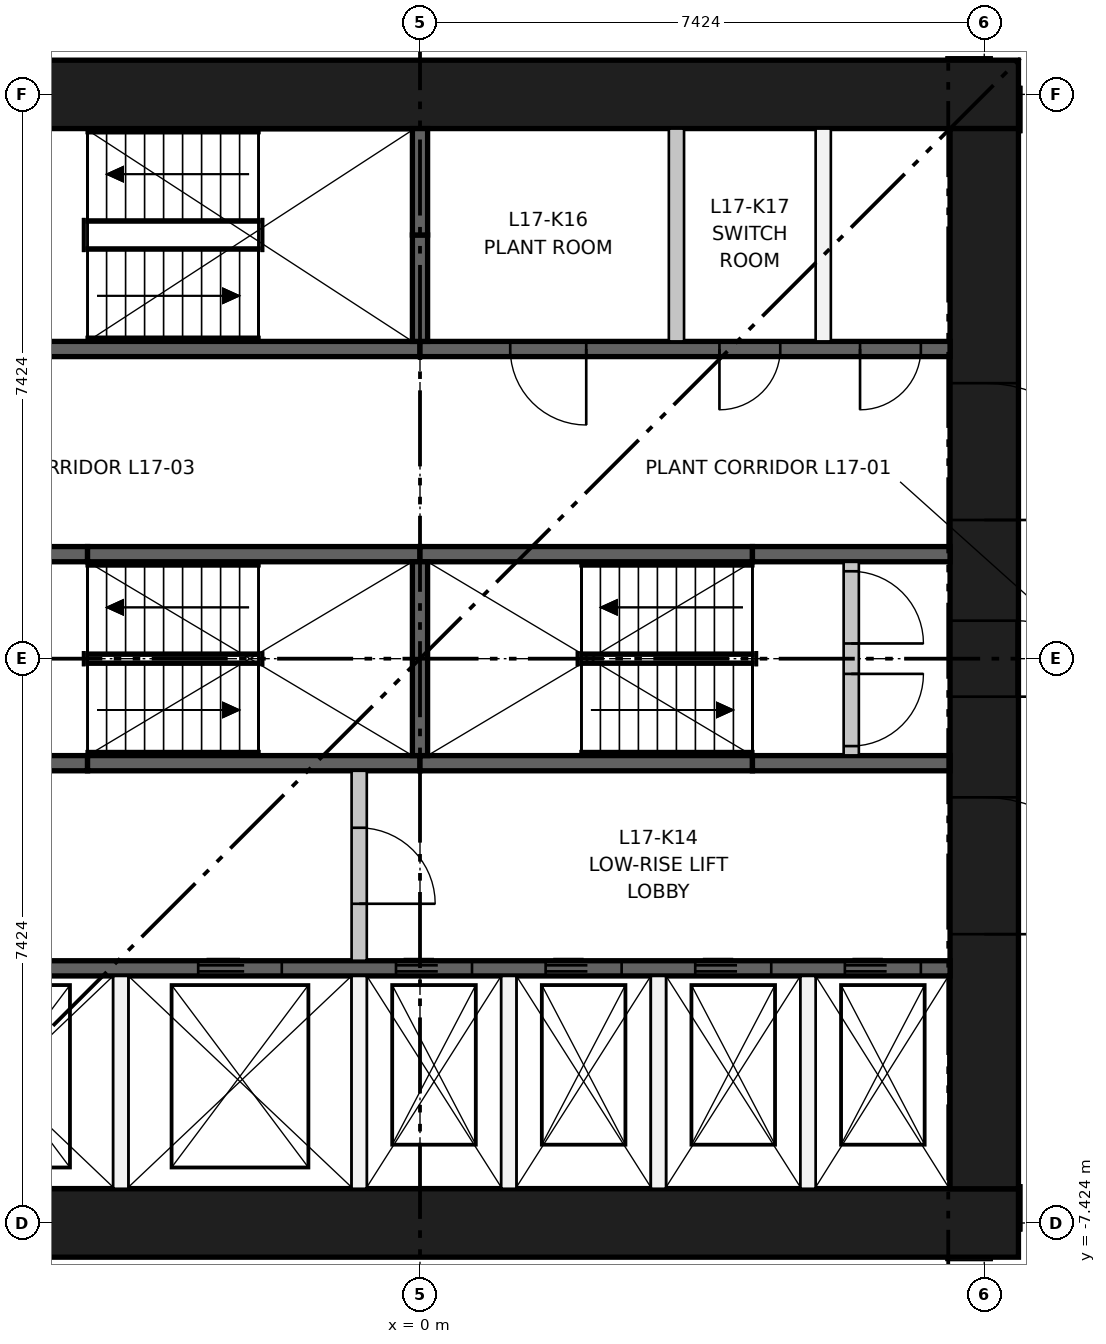
"""IFC4 building model, lengths in metres.
Left out: names, types, materials, properties, quantities, classifications, styles, units other than length and angle.
Written with IfcOpenShell. Run it as: python <this file> out.ifc"""

import sys

from ifc_helpers import new_model, si_unit, direction, frame, frame_2d, origin, place, context, subcontext, project, spatial, rectangle, extrude, element, fill, save


model = new_model("IFC4")
c1 = context("Model", 3, precision=1e-05, world=origin(), true_north=direction((0.0, 1.0)))
c2 = subcontext(c1, "Body", "Model", "MODEL_VIEW")
j1 = project(units=[si_unit("LENGTHUNIT", "METRE"), si_unit("PLANEANGLEUNIT", "RADIAN")], contexts=[c1])
p1 = place(None, origin())
s1 = spatial("IfcSite", under=j1, at=p1, CompositionType="ELEMENT")
p2 = place(p1, origin())
s2 = spatial("IfcBuilding", under=s1, at=p2, CompositionType="ELEMENT")
p3 = place(p2, frame((0.0, 0.0, 66.35)))
s3 = spatial("IfcBuildingStorey", under=s2, at=p3, CompositionType="ELEMENT", Elevation=66.35)
for number, where, z_axis, x_axis in (
    (1, (-7.874, -7.424, 0.0), (0.0, 0.0, 1.0), (1.0, 0.0, 0.0)),
    (2, (-7.874, 7.424, 0.0), (0.0, 0.0, 1.0), (1.0, 0.0, 0.0)),
):
    element("IfcWall", number, at=place(p3, frame(where, z_axis=z_axis, x_axis=x_axis)), inside=s3, PredefinedType="SHEAR", context=c2, shape_type="SweptSolid", body=[
        extrude(rectangle(XDim=15.748, YDim=0.9, at=frame_2d((7.874, 0.0))), origin(), (0.0, 0.0, 1.0), 6.4),
    ])
p4 = place(p3, frame((7.424, -6.974, 0.0), z_axis=(0.0, 0.0, 1.0), x_axis=(0.0, 1.0, 0.0)))
e3 = element("IfcWall", 3, at=p4, inside=s3, PredefinedType="SHEAR", context=c2, shape_type="SweptSolid", body=[
    extrude(rectangle(XDim=13.948, YDim=0.9, at=frame_2d((6.974, 0.0))), origin(), (0.0, 0.0, 1.0), 6.4),
])
p5 = place(p4, frame((6.474, 0.0, 0.0)))
e4 = element("IfcOpeningElement", 4, at=p5, cuts=e3, PredefinedType="OPENING", context=c2, shape_type="SweptSolid", body=[
    extrude(rectangle(XDim=1.0, YDim=2.1, at=frame_2d((0.5, 1.05))), frame((0.0, 0.46, 0.0), z_axis=(0.0, -1.0, 0.0), x_axis=(1.0, 0.0, 0.0)), (0.0, 0.0, 1.0), 0.92),
])
p6 = place(p4, frame((3.35, 0.0, 0.0)))
e5 = element("IfcOpeningElement", 5, at=p6, cuts=e3, PredefinedType="OPENING", context=c2, shape_type="SweptSolid", body=[
    extrude(rectangle(XDim=1.8, YDim=2.1, at=frame_2d((0.9, 1.05))), frame((0.0, 0.46, 0.0), z_axis=(0.0, -1.0, 0.0), x_axis=(1.0, 0.0, 0.0)), (0.0, 0.0, 1.0), 0.92),
])
p7 = place(p4, frame((8.799, 0.0, 0.0)))
e6 = element("IfcOpeningElement", 6, at=p7, cuts=e3, PredefinedType="OPENING", context=c2, shape_type="SweptSolid", body=[
    extrude(rectangle(XDim=1.8, YDim=2.1, at=frame_2d((0.9, 1.05))), frame((0.0, 0.46, 0.0), z_axis=(0.0, -1.0, 0.0), x_axis=(1.0, 0.0, 0.0)), (0.0, 0.0, 1.0), 0.92),
])
p8 = place(p3, frame((-6.974, -4.074, 0.0), z_axis=(0.0, 0.0, 1.0), x_axis=(1.0, 0.0, 0.0)))
e7 = element("IfcWall", 7, at=p8, inside=s3, PredefinedType="SHEAR", context=c2, shape_type="SweptSolid", body=[
    extrude(rectangle(XDim=13.948, YDim=0.2, at=frame_2d((6.974, 0.0))), origin(), (0.0, 0.0, 1.0), 6.05),
])
p9 = place(p8, frame((0.918, 0.0, 0.0)))
e8 = element("IfcOpeningElement", 8, at=p9, cuts=e7, PredefinedType="OPENING", context=c2, shape_type="SweptSolid", body=[
    extrude(rectangle(XDim=1.1, YDim=2.1, at=frame_2d((0.55, 1.05))), frame((0.0, 0.11, 0.0), z_axis=(0.0, -1.0, 0.0), x_axis=(1.0, 0.0, 0.0)), (0.0, 0.0, 1.0), 0.22),
])
p10 = place(p8, frame((4.055, 0.0, 0.0)))
e9 = element("IfcOpeningElement", 9, at=p10, cuts=e7, PredefinedType="OPENING", context=c2, shape_type="SweptSolid", body=[
    extrude(rectangle(XDim=1.1, YDim=2.1, at=frame_2d((0.55, 1.05))), frame((0.0, 0.11, 0.0), z_axis=(0.0, -1.0, 0.0), x_axis=(1.0, 0.0, 0.0)), (0.0, 0.0, 1.0), 0.22),
])
p11 = place(p8, frame((6.658, 0.0, 0.0)))
e10 = element("IfcOpeningElement", 10, at=p11, cuts=e7, PredefinedType="OPENING", context=c2, shape_type="SweptSolid", body=[
    extrude(rectangle(XDim=1.0, YDim=2.1, at=frame_2d((0.5, 1.05))), frame((0.0, 0.11, 0.0), z_axis=(0.0, -1.0, 0.0), x_axis=(1.0, 0.0, 0.0)), (0.0, 0.0, 1.0), 0.22),
])
p12 = place(p8, frame((8.627, 0.0, 0.0)))
e11 = element("IfcOpeningElement", 11, at=p12, cuts=e7, PredefinedType="OPENING", context=c2, shape_type="SweptSolid", body=[
    extrude(rectangle(XDim=1.0, YDim=2.1, at=frame_2d((0.5, 1.05))), frame((0.0, 0.11, 0.0), z_axis=(0.0, -1.0, 0.0), x_axis=(1.0, 0.0, 0.0)), (0.0, 0.0, 1.0), 0.22),
])
p13 = place(p8, frame((10.595, 0.0, 0.0)))
e12 = element("IfcOpeningElement", 12, at=p13, cuts=e7, PredefinedType="OPENING", context=c2, shape_type="SweptSolid", body=[
    extrude(rectangle(XDim=1.0, YDim=2.1, at=frame_2d((0.5, 1.05))), frame((0.0, 0.11, 0.0), z_axis=(0.0, -1.0, 0.0), x_axis=(1.0, 0.0, 0.0)), (0.0, 0.0, 1.0), 0.22),
])
p14 = place(p8, frame((12.564, 0.0, 0.0)))
e13 = element("IfcOpeningElement", 13, at=p14, cuts=e7, PredefinedType="OPENING", context=c2, shape_type="SweptSolid", body=[
    extrude(rectangle(XDim=1.0, YDim=2.1, at=frame_2d((0.5, 1.05))), frame((0.0, 0.11, 0.0), z_axis=(0.0, -1.0, 0.0), x_axis=(1.0, 0.0, 0.0)), (0.0, 0.0, 1.0), 0.22),
])
p15 = place(p3, frame((-6.974, 4.074, 0.0), z_axis=(0.0, 0.0, 1.0), x_axis=(1.0, 0.0, 0.0)))
e14 = element("IfcWall", 14, at=p15, inside=s3, PredefinedType="SHEAR", context=c2, shape_type="SweptSolid", body=[
    extrude(rectangle(XDim=6.974, YDim=0.2, at=frame_2d((3.487, 0.0))), origin(), (0.0, 0.0, 1.0), 6.05),
])
p16 = place(p3, frame((0.0, 4.074, 0.0), z_axis=(0.0, 0.0, 1.0), x_axis=(1.0, 0.0, 0.0)))
e15 = element("IfcWall", 15, at=p16, inside=s3, PredefinedType="SHEAR", context=c2, shape_type="SweptSolid", body=[
    extrude(rectangle(XDim=6.974, YDim=0.2, at=frame_2d((3.487, 0.0))), origin(), (0.0, 0.0, 1.0), 6.05),
])
p17 = place(p16, frame((1.187, 0.0, 0.0)))
e16 = element("IfcOpeningElement", 16, at=p17, cuts=e15, PredefinedType="OPENING", context=c2, shape_type="SweptSolid", body=[
    extrude(rectangle(XDim=1.0, YDim=2.1, at=frame_2d((0.5, 1.05))), frame((0.0, 0.11, 0.0), z_axis=(0.0, -1.0, 0.0), x_axis=(1.0, 0.0, 0.0)), (0.0, 0.0, 1.0), 0.22),
])
p18 = place(p16, frame((3.94, 0.0, 0.0)))
e17 = element("IfcOpeningElement", 17, at=p18, cuts=e15, PredefinedType="OPENING", context=c2, shape_type="SweptSolid", body=[
    extrude(rectangle(XDim=0.8, YDim=2.1, at=frame_2d((0.4, 1.05))), frame((0.0, 0.11, 0.0), z_axis=(0.0, -1.0, 0.0), x_axis=(1.0, 0.0, 0.0)), (0.0, 0.0, 1.0), 0.22),
])
p19 = place(p16, frame((5.79, 0.0, 0.0)))
e18 = element("IfcOpeningElement", 18, at=p19, cuts=e15, PredefinedType="OPENING", context=c2, shape_type="SweptSolid", body=[
    extrude(rectangle(XDim=0.8, YDim=2.1, at=frame_2d((0.4, 1.05))), frame((0.0, 0.11, 0.0), z_axis=(0.0, -1.0, 0.0), x_axis=(1.0, 0.0, 0.0)), (0.0, 0.0, 1.0), 0.22),
])
p20 = place(p3, frame((-6.974, -1.375, 0.0), z_axis=(0.0, 0.0, 1.0), x_axis=(1.0, 0.0, 0.0)))
e19 = element("IfcWall", 19, at=p20, inside=s3, PredefinedType="SHEAR", context=c2, shape_type="SweptSolid", body=[
    extrude(rectangle(XDim=2.6, YDim=0.2, at=frame_2d((1.3, 0.0))), origin(), (0.0, 0.0, 1.0), 6.05),
])
for number, where, z_axis, x_axis in (
    (20, (-4.374, -1.375, 0.0), (0.0, 0.0, 1.0), (1.0, 0.0, 0.0)),
    (21, (0.0, -1.375, 0.0), (0.0, 0.0, 1.0), (1.0, 0.0, 0.0)),
):
    element("IfcWall", number, at=place(p3, frame(where, z_axis=z_axis, x_axis=x_axis)), inside=s3, PredefinedType="SHEAR", context=c2, shape_type="SweptSolid", body=[
        extrude(rectangle(XDim=4.374, YDim=0.2, at=frame_2d((2.187, 0.0))), origin(), (0.0, 0.0, 1.0), 6.05),
    ])
for number, where, z_axis, x_axis in (
    (22, (4.374, -1.375, 0.0), (0.0, 0.0, 1.0), (1.0, 0.0, 0.0)),
    (23, (-6.974, 1.375, 0.0), (0.0, 0.0, 1.0), (1.0, 0.0, 0.0)),
):
    element("IfcWall", number, at=place(p3, frame(where, z_axis=z_axis, x_axis=x_axis)), inside=s3, PredefinedType="SHEAR", context=c2, shape_type="SweptSolid", body=[
        extrude(rectangle(XDim=2.6, YDim=0.2, at=frame_2d((1.3, 0.0))), origin(), (0.0, 0.0, 1.0), 6.05),
    ])
for number, where, z_axis, x_axis in (
    (24, (-4.374, 1.375, 0.0), (0.0, 0.0, 1.0), (1.0, 0.0, 0.0)),
    (25, (0.0, 1.375, 0.0), (0.0, 0.0, 1.0), (1.0, 0.0, 0.0)),
):
    element("IfcWall", number, at=place(p3, frame(where, z_axis=z_axis, x_axis=x_axis)), inside=s3, PredefinedType="SHEAR", context=c2, shape_type="SweptSolid", body=[
        extrude(rectangle(XDim=4.374, YDim=0.2, at=frame_2d((2.187, 0.0))), origin(), (0.0, 0.0, 1.0), 6.05),
    ])
p21 = place(p3, frame((4.374, 1.375, 0.0), z_axis=(0.0, 0.0, 1.0), x_axis=(1.0, 0.0, 0.0)))
e26 = element("IfcWall", 26, at=p21, inside=s3, PredefinedType="SHEAR", context=c2, shape_type="SweptSolid", body=[
    extrude(rectangle(XDim=2.6, YDim=0.2, at=frame_2d((1.3, 0.0))), origin(), (0.0, 0.0, 1.0), 6.05),
])
p22 = place(p3, frame((0.0, -1.275, 0.0), z_axis=(0.0, 0.0, 1.0), x_axis=(0.0, 1.0, 0.0)))
e27 = element("IfcWall", 27, at=p22, inside=s3, PredefinedType="SHEAR", context=c2, shape_type="SweptSolid", body=[
    extrude(rectangle(XDim=2.55, YDim=0.2, at=frame_2d((1.275, 0.0))), origin(), (0.0, 0.0, 1.0), 6.05),
])
for number, where, z_axis, x_axis in (
    (28, (-3.937, -6.974, 0.0), (0.0, 0.0, 1.0), (0.0, 1.0, 0.0)),
    (29, (-0.8, -6.974, 0.0), (0.0, 0.0, 1.0), (0.0, 1.0, 0.0)),
):
    element("IfcWall", number, at=place(p3, frame(where, z_axis=z_axis, x_axis=x_axis)), inside=s3, PredefinedType="PARTITIONING", context=c2, shape_type="SweptSolid", body=[
        extrude(rectangle(XDim=2.8, YDim=0.2, at=frame_2d((1.4, 0.0))), origin(), (0.0, 0.0, 1.0), 6.05),
    ])
p23 = place(p3, frame((-0.8, -3.974, 0.0), z_axis=(0.0, 0.0, 1.0), x_axis=(0.0, 1.0, 0.0)))
e30 = element("IfcWall", 30, at=p23, inside=s3, PredefinedType="PARTITIONING", context=c2, shape_type="SweptSolid", body=[
    extrude(rectangle(XDim=2.499, YDim=0.2, at=frame_2d((1.25, 0.0))), origin(), (0.0, 0.0, 1.0), 6.05),
])
p24 = place(p23, frame((0.75, 0.0, 0.0)))
e31 = element("IfcOpeningElement", 31, at=p24, cuts=e30, PredefinedType="OPENING", context=c2, shape_type="SweptSolid", body=[
    extrude(rectangle(XDim=1.0, YDim=2.1, at=frame_2d((0.5, 1.05))), frame((0.0, 0.11, 0.0), z_axis=(0.0, -1.0, 0.0), x_axis=(1.0, 0.0, 0.0)), (0.0, 0.0, 1.0), 0.22),
])
for number, where, z_axis, x_axis in (
    (32, (1.168, -6.974, 0.0), (0.0, 0.0, 1.0), (0.0, 1.0, 0.0)),
    (33, (3.137, -6.974, 0.0), (0.0, 0.0, 1.0), (0.0, 1.0, 0.0)),
    (34, (5.105, -6.974, 0.0), (0.0, 0.0, 1.0), (0.0, 1.0, 0.0)),
):
    element("IfcWall", number, at=place(p3, frame(where, z_axis=z_axis, x_axis=x_axis)), inside=s3, PredefinedType="PARTITIONING", context=c2, shape_type="SweptSolid", body=[
        extrude(rectangle(XDim=2.8, YDim=0.2, at=frame_2d((1.4, 0.0))), origin(), (0.0, 0.0, 1.0), 6.05),
    ])
p25 = place(p3, frame((0.0, 4.174, 0.0), z_axis=(0.0, 0.0, 1.0), x_axis=(0.0, 1.0, 0.0)))
e35 = element("IfcWall", 35, at=p25, inside=s3, PredefinedType="SHEAR", context=c2, shape_type="SweptSolid", body=[
    extrude(rectangle(XDim=1.4, YDim=0.2, at=frame_2d((0.7, 0.0))), origin(), (0.0, 0.0, 1.0), 6.05),
])
p26 = place(p3, frame((0.0, 5.574, 0.0), z_axis=(0.0, 0.0, 1.0), x_axis=(0.0, 1.0, 0.0)))
e36 = element("IfcWall", 36, at=p26, inside=s3, PredefinedType="SHEAR", context=c2, shape_type="SweptSolid", body=[
    extrude(rectangle(XDim=1.4, YDim=0.2, at=frame_2d((0.7, 0.0))), origin(), (0.0, 0.0, 1.0), 6.05),
])
for number, where, z_axis, x_axis in (
    (37, (3.374, 4.174, 0.0), (0.0, 0.0, 1.0), (0.0, 1.0, 0.0)),
    (38, (5.305, 4.174, 0.0), (0.0, 0.0, 1.0), (0.0, 1.0, 0.0)),
):
    element("IfcWall", number, at=place(p3, frame(where, z_axis=z_axis, x_axis=x_axis)), inside=s3, PredefinedType="PARTITIONING", context=c2, shape_type="SweptSolid", body=[
        extrude(rectangle(XDim=2.8, YDim=0.2, at=frame_2d((1.4, 0.0))), origin(), (0.0, 0.0, 1.0), 6.05),
    ])
p27 = place(p3, frame((5.674, -1.275, 0.0), z_axis=(0.0, 0.0, 1.0), x_axis=(0.0, 1.0, 0.0)))
e39 = element("IfcWall", 39, at=p27, inside=s3, PredefinedType="PARTITIONING", context=c2, shape_type="SweptSolid", body=[
    extrude(rectangle(XDim=2.55, YDim=0.2, at=frame_2d((1.275, 0.0))), origin(), (0.0, 0.0, 1.0), 6.05),
])
p28 = place(p27, frame((0.125, 0.0, 0.0)))
e40 = element("IfcOpeningElement", 40, at=p28, cuts=e39, PredefinedType="OPENING", context=c2, shape_type="SweptSolid", body=[
    extrude(rectangle(XDim=0.95, YDim=2.1, at=frame_2d((0.475, 1.05))), frame((0.0, 0.11, 0.0), z_axis=(0.0, -1.0, 0.0), x_axis=(1.0, 0.0, 0.0)), (0.0, 0.0, 1.0), 0.22),
])
p29 = place(p27, frame((1.475, 0.0, 0.0)))
e41 = element("IfcOpeningElement", 41, at=p29, cuts=e39, PredefinedType="OPENING", context=c2, shape_type="SweptSolid", body=[
    extrude(rectangle(XDim=0.95, YDim=2.1, at=frame_2d((0.475, 1.05))), frame((0.0, 0.11, 0.0), z_axis=(0.0, -1.0, 0.0), x_axis=(1.0, 0.0, 0.0)), (0.0, 0.0, 1.0), 0.22),
])
p30 = place(p10, origin())
e42 = element("IfcDoor", 42, at=p30, inside=s3, OperationType="DOUBLE_DOOR_SLIDING", PredefinedType="DOOR", context=c2, shape_type="SweptSolid", body=[
    extrude(rectangle(XDim=1.1, YDim=2.1, at=frame_2d((0.55, 1.05))), frame((0.0, 0.025, 0.0), z_axis=(0.0, -1.0, 0.0), x_axis=(1.0, 0.0, 0.0)), (0.0, 0.0, 1.0), 0.05),
])
fill(e9, e42)
p31 = place(p11, origin())
e43 = element("IfcDoor", 43, at=p31, inside=s3, OperationType="DOUBLE_DOOR_SLIDING", PredefinedType="DOOR", context=c2, shape_type="SweptSolid", body=[
    extrude(rectangle(XDim=1.0, YDim=2.1, at=frame_2d((0.5, 1.05))), frame((0.0, 0.025, 0.0), z_axis=(0.0, -1.0, 0.0), x_axis=(1.0, 0.0, 0.0)), (0.0, 0.0, 1.0), 0.05),
])
fill(e10, e43)
p32 = place(p12, origin())
e44 = element("IfcDoor", 44, at=p32, inside=s3, OperationType="DOUBLE_DOOR_SLIDING", PredefinedType="DOOR", context=c2, shape_type="SweptSolid", body=[
    extrude(rectangle(XDim=1.0, YDim=2.1, at=frame_2d((0.5, 1.05))), frame((0.0, 0.025, 0.0), z_axis=(0.0, -1.0, 0.0), x_axis=(1.0, 0.0, 0.0)), (0.0, 0.0, 1.0), 0.05),
])
fill(e11, e44)
p33 = place(p13, origin())
e45 = element("IfcDoor", 45, at=p33, inside=s3, OperationType="DOUBLE_DOOR_SLIDING", PredefinedType="DOOR", context=c2, shape_type="SweptSolid", body=[
    extrude(rectangle(XDim=1.0, YDim=2.1, at=frame_2d((0.5, 1.05))), frame((0.0, 0.025, 0.0), z_axis=(0.0, -1.0, 0.0), x_axis=(1.0, 0.0, 0.0)), (0.0, 0.0, 1.0), 0.05),
])
fill(e12, e45)
p34 = place(p14, origin())
e46 = element("IfcDoor", 46, at=p34, inside=s3, OperationType="DOUBLE_DOOR_SLIDING", PredefinedType="DOOR", context=c2, shape_type="SweptSolid", body=[
    extrude(rectangle(XDim=1.0, YDim=2.1, at=frame_2d((0.5, 1.05))), frame((0.0, 0.025, 0.0), z_axis=(0.0, -1.0, 0.0), x_axis=(1.0, 0.0, 0.0)), (0.0, 0.0, 1.0), 0.05),
])
fill(e13, e46)
p35 = place(p28, frame((0.95, 0.0, 0.0), z_axis=(0.0, 0.0, 1.0), x_axis=(-1.0, 0.0, 0.0)))
e47 = element("IfcDoor", 47, at=p35, inside=s3, OperationType="SINGLE_SWING_RIGHT", PredefinedType="DOOR", context=c2, shape_type="SweptSolid", body=[
    extrude(rectangle(XDim=0.95, YDim=2.1, at=frame_2d((0.475, 1.05))), frame((0.0, 0.025, 0.0), z_axis=(0.0, -1.0, 0.0), x_axis=(1.0, 0.0, 0.0)), (0.0, 0.0, 1.0), 0.05),
])
fill(e40, e47)
p36 = place(p29, frame((0.95, 0.0, 0.0), z_axis=(0.0, 0.0, 1.0), x_axis=(-1.0, 0.0, 0.0)))
e48 = element("IfcDoor", 48, at=p36, inside=s3, OperationType="SINGLE_SWING_LEFT", PredefinedType="DOOR", context=c2, shape_type="SweptSolid", body=[
    extrude(rectangle(XDim=0.95, YDim=2.1, at=frame_2d((0.475, 1.05))), frame((0.0, 0.025, 0.0), z_axis=(0.0, -1.0, 0.0), x_axis=(1.0, 0.0, 0.0)), (0.0, 0.0, 1.0), 0.05),
])
fill(e41, e48)
p37 = place(p24, frame((1.0, 0.0, 0.0), z_axis=(0.0, 0.0, 1.0), x_axis=(-1.0, 0.0, 0.0)))
e49 = element("IfcDoor", 49, at=p37, inside=s3, OperationType="SINGLE_SWING_LEFT", PredefinedType="DOOR", context=c2, shape_type="SweptSolid", body=[
    extrude(rectangle(XDim=1.0, YDim=2.1, at=frame_2d((0.5, 1.05))), frame((0.0, 0.025, 0.0), z_axis=(0.0, -1.0, 0.0), x_axis=(1.0, 0.0, 0.0)), (0.0, 0.0, 1.0), 0.05),
])
fill(e31, e49)
p38 = place(p17, frame((1.0, 0.0, 0.0), z_axis=(0.0, 0.0, 1.0), x_axis=(-1.0, 0.0, 0.0)))
e50 = element("IfcDoor", 50, at=p38, inside=s3, OperationType="SINGLE_SWING_RIGHT", PredefinedType="DOOR", context=c2, shape_type="SweptSolid", body=[
    extrude(rectangle(XDim=1.0, YDim=2.1, at=frame_2d((0.5, 1.05))), frame((0.0, 0.025, 0.0), z_axis=(0.0, -1.0, 0.0), x_axis=(1.0, 0.0, 0.0)), (0.0, 0.0, 1.0), 0.05),
])
fill(e16, e50)
p39 = place(p18, frame((0.8, 0.0, 0.0), z_axis=(0.0, 0.0, 1.0), x_axis=(-1.0, 0.0, 0.0)))
e51 = element("IfcDoor", 51, at=p39, inside=s3, OperationType="SINGLE_SWING_LEFT", PredefinedType="DOOR", context=c2, shape_type="SweptSolid", body=[
    extrude(rectangle(XDim=0.8, YDim=2.1, at=frame_2d((0.4, 1.05))), frame((0.0, 0.025, 0.0), z_axis=(0.0, -1.0, 0.0), x_axis=(1.0, 0.0, 0.0)), (0.0, 0.0, 1.0), 0.05),
])
fill(e17, e51)
p40 = place(p19, frame((0.8, 0.0, 0.0), z_axis=(0.0, 0.0, 1.0), x_axis=(-1.0, 0.0, 0.0)))
e52 = element("IfcDoor", 52, at=p40, inside=s3, OperationType="SINGLE_SWING_LEFT", PredefinedType="DOOR", context=c2, shape_type="SweptSolid", body=[
    extrude(rectangle(XDim=0.8, YDim=2.1, at=frame_2d((0.4, 1.05))), frame((0.0, 0.025, 0.0), z_axis=(0.0, -1.0, 0.0), x_axis=(1.0, 0.0, 0.0)), (0.0, 0.0, 1.0), 0.05),
])
fill(e18, e52)
p41 = place(p5, frame((1.0, 0.0, 0.0), z_axis=(0.0, 0.0, 1.0), x_axis=(-1.0, 0.0, 0.0)))
e53 = element("IfcDoor", 53, at=p41, inside=s3, OperationType="SINGLE_SWING_LEFT", PredefinedType="DOOR", context=c2, shape_type="SweptSolid", body=[
    extrude(rectangle(XDim=1.0, YDim=2.1, at=frame_2d((0.5, 1.05))), frame((0.0, 0.45, 0.0), z_axis=(0.0, -1.0, 0.0), x_axis=(1.0, 0.0, 0.0)), (0.0, 0.0, 1.0), 0.05),
])
fill(e4, e53)
p42 = place(p6, frame((1.8, 0.0, 0.0), z_axis=(0.0, 0.0, 1.0), x_axis=(-1.0, 0.0, 0.0)))
e54 = element("IfcDoor", 54, at=p42, inside=s3, OperationType="DOUBLE_DOOR_SINGLE_SWING", PredefinedType="DOOR", context=c2, shape_type="SweptSolid", body=[
    extrude(rectangle(XDim=1.8, YDim=2.1, at=frame_2d((0.9, 1.05))), frame((0.0, 0.025, 0.0), z_axis=(0.0, -1.0, 0.0), x_axis=(1.0, 0.0, 0.0)), (0.0, 0.0, 1.0), 0.05),
])
fill(e5, e54)
p43 = place(p7, frame((1.8, 0.0, 0.0), z_axis=(0.0, 0.0, 1.0), x_axis=(-1.0, 0.0, 0.0)))
e55 = element("IfcDoor", 55, at=p43, inside=s3, OperationType="DOUBLE_DOOR_SINGLE_SWING", PredefinedType="DOOR", context=c2, shape_type="SweptSolid", body=[
    extrude(rectangle(XDim=1.8, YDim=2.1, at=frame_2d((0.9, 1.05))), frame((0.0, 0.025, 0.0), z_axis=(0.0, -1.0, 0.0), x_axis=(1.0, 0.0, 0.0)), (0.0, 0.0, 1.0), 0.05),
])
fill(e6, e55)
save(model, sys.argv[1])
